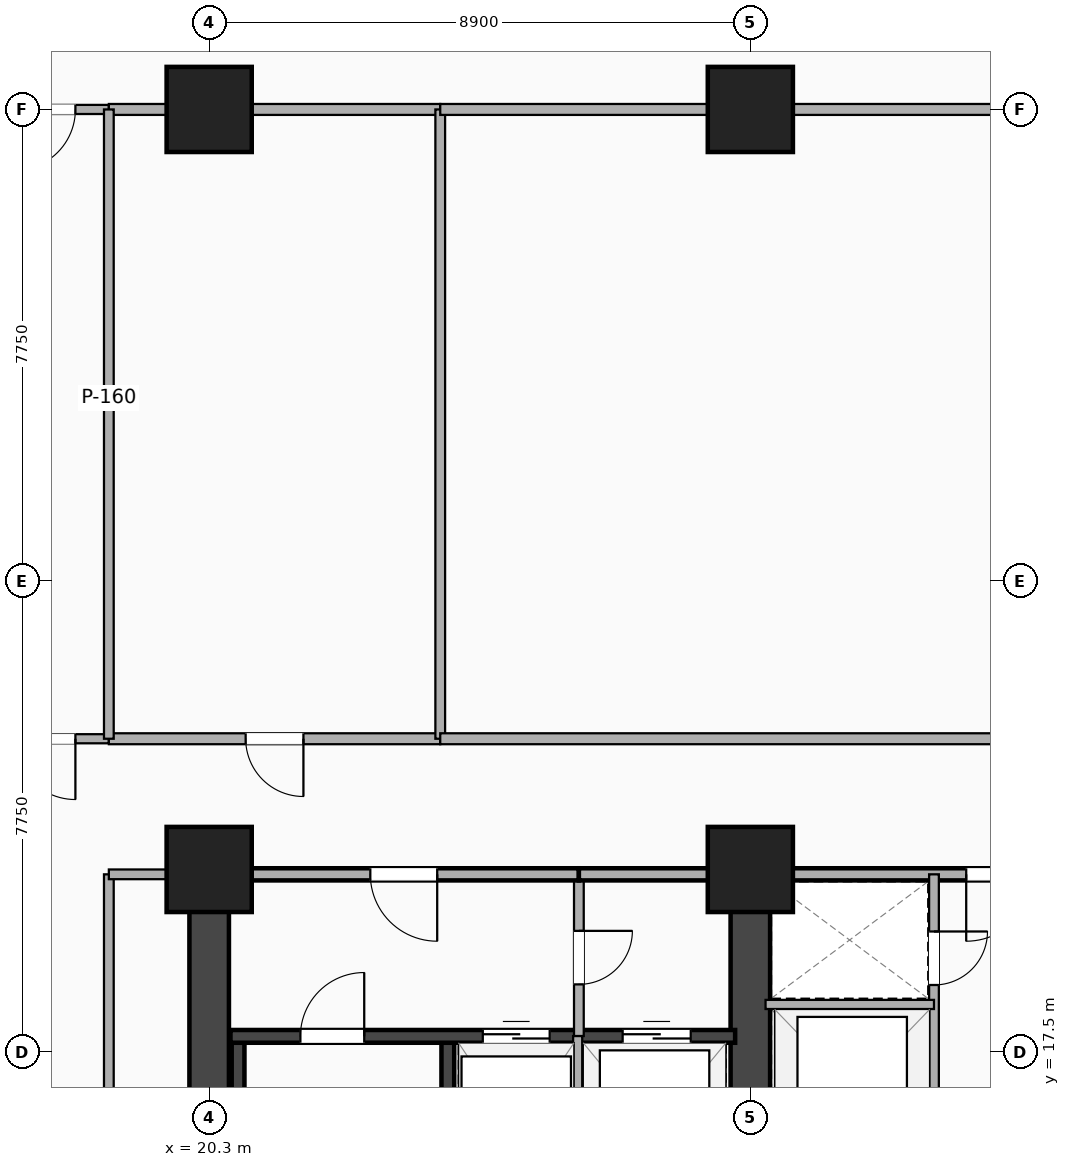
"""IFC4 building model, lengths in metres.
Left out: names, types, materials, properties, quantities, classifications, styles, units other than length and angle.
Written with IfcOpenShell. Run it as: python <this file> out.ifc"""

import sys

from ifc_helpers import new_model, si_unit, direction, frame, frame_2d, origin, origin_2d, place, context, subcontext, project, spatial, rectangle, extrude, element, fill, save


model = new_model("IFC4")
c1 = context("Model", 3, precision=1e-05, world=origin(), true_north=direction((0.0, 1.0)))
c2 = subcontext(c1, "Body", "Model", "MODEL_VIEW")
j1 = project(units=[si_unit("LENGTHUNIT", "METRE"), si_unit("PLANEANGLEUNIT", "RADIAN")], contexts=[c1])
p1 = place(None, origin())
s1 = spatial("IfcSite", under=j1, at=p1, CompositionType="ELEMENT")
p2 = place(p1, origin())
s2 = spatial("IfcBuilding", under=s1, at=p2, CompositionType="ELEMENT")
p3 = place(p2, frame((0.0, 0.0, 64.9)))
s3 = spatial("IfcBuildingStorey", under=s2, at=p3, CompositionType="ELEMENT", Elevation=64.9)
p4 = place(p3, frame((20.3, 3.5, 0.0), z_axis=(0.0, 0.0, 1.0), x_axis=(0.0, 1.0, 0.0)))
e1 = element("IfcWall", 1, at=p4, inside=s3, PredefinedType="SHEAR", context=c2, shape_type="SweptSolid", body=[
    extrude(rectangle(XDim=16.9, YDim=0.65, at=frame_2d((8.45, 0.0))), origin(), (0.0, 0.0, 1.0), 3.22),
])
p5 = place(p3, frame((29.2, 3.5, 0.0), z_axis=(0.0, 0.0, 1.0), x_axis=(0.0, 1.0, 0.0)))
e2 = element("IfcWall", 2, at=p5, inside=s3, PredefinedType="SHEAR", context=c2, shape_type="SweptSolid", body=[
    extrude(rectangle(XDim=16.9, YDim=0.65, at=frame_2d((8.45, 0.0))), origin(), (0.0, 0.0, 1.0), 3.22),
])
p6 = place(p5, frame((7.75, 0.0, 0.0), z_axis=(0.0, 0.0, 1.0), x_axis=(-1.0, 0.0, 0.0)))
e3 = element("IfcOpeningElement", 3, at=p6, cuts=e2, PredefinedType="OPENING", context=c2, shape_type="SweptSolid", body=[
    extrude(rectangle(XDim=1.1, YDim=2.15, at=frame_2d((0.55, 1.075))), frame((0.0, 0.335, 0.0), z_axis=(0.0, -1.0, 0.0), x_axis=(1.0, 0.0, 0.0)), (0.0, 0.0, 1.0), 0.67),
])
for number, where, z_axis, x_axis in (
    (4, (20.775, 9.745, 0.0), (0.0, 0.0, 1.0), (0.0, 1.0, 0.0)),
    (5, (24.225, 9.745, 0.0), (0.0, 0.0, 1.0), (0.0, 1.0, 0.0)),
):
    element("IfcWall", number, at=place(p3, frame(where, z_axis=z_axis, x_axis=x_axis)), inside=s3, PredefinedType="SHEAR", context=c2, shape_type="SweptSolid", body=[
        extrude(rectangle(XDim=8.01, YDim=0.21, at=frame_2d((4.005, 0.0))), origin(), (0.0, 0.0, 1.0), 3.22),
    ])
p7 = place(p3, frame((20.65, 17.755, 0.0), z_axis=(0.0, 0.0, 1.0), x_axis=(1.0, 0.0, 0.0)))
e6 = element("IfcWall", 6, at=p7, inside=s3, PredefinedType="SHEAR", context=c2, shape_type="SweptSolid", body=[
    extrude(rectangle(XDim=8.3, YDim=0.21, at=frame_2d((4.15, 0.0))), origin(), (0.0, 0.0, 1.0), 3.22),
])
p8 = place(p7, frame((2.2, 0.0, 0.0), z_axis=(0.0, 0.0, 1.0), x_axis=(-1.0, 0.0, 0.0)))
e7 = element("IfcOpeningElement", 7, at=p8, cuts=e6, PredefinedType="OPENING", context=c2, shape_type="SweptSolid", body=[
    extrude(rectangle(XDim=1.05, YDim=2.15, at=frame_2d((0.525, 1.075))), frame((0.0, 0.115, 0.0), z_axis=(0.0, -1.0, 0.0), x_axis=(1.0, 0.0, 0.0)), (0.0, 0.0, 1.0), 0.23),
])
p9 = place(p7, frame((4.15, 0.0, 0.0)))
e8 = element("IfcOpeningElement", 8, at=p9, cuts=e6, PredefinedType="OPENING", context=c2, shape_type="SweptSolid", body=[
    extrude(rectangle(XDim=1.1, YDim=2.18, at=frame_2d((0.55, 1.09))), frame((0.0, 0.115, 0.0), z_axis=(0.0, -1.0, 0.0), x_axis=(1.0, 0.0, 0.0)), (0.0, 0.0, 1.0), 0.23),
])
p10 = place(p7, frame((6.45, 0.0, 0.0)))
e9 = element("IfcOpeningElement", 9, at=p10, cuts=e6, PredefinedType="OPENING", context=c2, shape_type="SweptSolid", body=[
    extrude(rectangle(XDim=1.12, YDim=2.2, at=frame_2d((0.56, 1.1))), frame((0.0, 0.115, 0.0), z_axis=(0.0, -1.0, 0.0), x_axis=(1.0, 0.0, 0.0)), (0.0, 0.0, 1.0), 0.23),
])
for number, where, z_axis, x_axis in (
    (10, (20.3, 20.5, -0.28), (0.0, 0.0, 1.0), (1.0, 0.0, 0.0)),
    (11, (29.2, 20.5, -0.28), (0.0, 0.0, 1.0), (1.0, 0.0, 0.0)),
    (12, (20.3, 33.0, -0.28), (0.0, 0.0, 1.0), (1.0, 0.0, 0.0)),
    (13, (29.2, 33.0, -0.28), (0.0, 0.0, 1.0), (1.0, 0.0, 0.0)),
):
    element("IfcColumn", number, at=place(p3, frame(where, z_axis=z_axis, x_axis=x_axis)), inside=s3, PredefinedType="COLUMN", context=c2, shape_type="SweptSolid", body=[
        extrude(rectangle(XDim=1.4, YDim=1.4, at=origin_2d()), origin(), (0.0, 0.0, 1.0), 3.5),
    ])
p11 = place(p3, frame((26.38, 17.76, 0.0), z_axis=(0.0, 0.0, 1.0), x_axis=(0.0, 1.0, 0.0)))
e14 = element("IfcWall", 14, at=p11, inside=s3, PredefinedType="PARTITIONING", context=c2, shape_type="SweptSolid", body=[
    extrude(rectangle(XDim=2.66, YDim=0.16, at=frame_2d((1.33, 0.0))), origin(), (0.0, 0.0, 1.0), 2.51),
])
p12 = place(p11, frame((0.85, 0.0, 0.0)))
e15 = element("IfcOpeningElement", 15, at=p12, cuts=e14, PredefinedType="OPENING", context=c2, shape_type="SweptSolid", body=[
    extrude(rectangle(XDim=0.88, YDim=2.08, at=frame_2d((0.44, 1.04))), frame((0.0, 0.09, 0.0), z_axis=(0.0, -1.0, 0.0), x_axis=(1.0, 0.0, 0.0)), (0.0, 0.0, 1.0), 0.18),
])
p13 = place(p3, frame((26.36, 14.72, 0.0), z_axis=(0.0, 0.0, 1.0), x_axis=(0.0, 1.0, 0.0)))
e16 = element("IfcWall", 16, at=p13, inside=s3, PredefinedType="PARTITIONING", context=c2, shape_type="SweptSolid", body=[
    extrude(rectangle(XDim=3.04, YDim=0.15, at=frame_2d((1.52, 0.0))), origin(), (0.0, 0.0, 1.0), 3.22),
])
p14 = place(p3, frame((20.65, 20.42, 0.0), z_axis=(0.0, 0.0, 1.0), x_axis=(1.0, 0.0, 0.0)))
e17 = element("IfcWall", 17, at=p14, inside=s3, PredefinedType="PARTITIONING", context=c2, shape_type="SweptSolid", body=[
    extrude(rectangle(XDim=5.73, YDim=0.2, at=frame_2d((2.865, 0.0))), origin(), (0.0, 0.0, 1.0), 2.51),
])
p15 = place(p14, frame((2.3, 0.0, 0.0)))
e18 = element("IfcOpeningElement", 18, at=p15, cuts=e17, PredefinedType="OPENING", context=c2, shape_type="SweptSolid", body=[
    extrude(rectangle(XDim=1.1, YDim=2.15, at=frame_2d((0.55, 1.075))), frame((0.0, 0.11, 0.0), z_axis=(0.0, -1.0, 0.0), x_axis=(1.0, 0.0, 0.0)), (0.0, 0.0, 1.0), 0.22),
])
p16 = place(p3, frame((26.38, 20.42, 0.0), z_axis=(0.0, 0.0, 1.0), x_axis=(1.0, 0.0, 0.0)))
e19 = element("IfcWall", 19, at=p16, inside=s3, PredefinedType="PARTITIONING", context=c2, shape_type="SweptSolid", body=[
    extrude(rectangle(XDim=2.82, YDim=0.2, at=frame_2d((1.41, 0.0))), origin(), (0.0, 0.0, 1.0), 2.51),
])
p17 = place(p3, frame((29.2, 20.42, 0.0), z_axis=(0.0, 0.0, 1.0), x_axis=(1.0, 0.0, 0.0)))
e20 = element("IfcWall", 20, at=p17, inside=s3, PredefinedType="PARTITIONING", context=c2, shape_type="SweptSolid", body=[
    extrude(rectangle(XDim=7.8, YDim=0.2, at=frame_2d((3.9, 0.0))), origin(), (0.0, 0.0, 1.0), 2.51),
])
p18 = place(p17, frame((3.55, 0.0, 0.0)))
e21 = element("IfcOpeningElement", 21, at=p18, cuts=e20, PredefinedType="OPENING", context=c2, shape_type="SweptSolid", body=[
    extrude(rectangle(XDim=1.1, YDim=2.15, at=frame_2d((0.55, 1.075))), frame((0.0, 0.11, 0.0), z_axis=(0.0, -1.0, 0.0), x_axis=(1.0, 0.0, 0.0)), (0.0, 0.0, 1.0), 0.22),
])
p19 = place(p3, frame((32.22, 12.5, 0.0), z_axis=(0.0, 0.0, 1.0), x_axis=(0.0, 1.0, 0.0)))
e22 = element("IfcWall", 22, at=p19, inside=s3, PredefinedType="PARTITIONING", context=c2, shape_type="SweptSolid", body=[
    extrude(rectangle(XDim=7.92, YDim=0.16, at=frame_2d((3.96, 0.0))), origin(), (0.0, 0.0, 1.0), 2.51),
])
p20 = place(p19, frame((6.1, 0.0, 0.0)))
e23 = element("IfcOpeningElement", 23, at=p20, cuts=e22, PredefinedType="OPENING", context=c2, shape_type="SweptSolid", body=[
    extrude(rectangle(XDim=0.88, YDim=2.08, at=frame_2d((0.44, 1.04))), frame((0.0, 0.09, 0.0), z_axis=(0.0, -1.0, 0.0), x_axis=(1.0, 0.0, 0.0)), (0.0, 0.0, 1.0), 0.18),
])
p21 = place(p3, frame((29.45, 18.28, 0.0), z_axis=(0.0, 0.0, 1.0), x_axis=(1.0, 0.0, 0.0)))
e24 = element("IfcWall", 24, at=p21, inside=s3, PredefinedType="PARTITIONING", context=c2, shape_type="SweptSolid", body=[
    extrude(rectangle(XDim=2.77, YDim=0.15, at=frame_2d((1.385, 0.0))), origin(), (0.0, 0.0, 1.0), 3.22),
])
p22 = place(p3, frame((18.65, 12.1, 0.0), z_axis=(0.0, 0.0, 1.0), x_axis=(0.0, 1.0, 0.0)))
e25 = element("IfcWall", 25, at=p22, inside=s3, PredefinedType="PARTITIONING", context=c2, shape_type="SweptSolid", body=[
    extrude(rectangle(XDim=8.32, YDim=0.16, at=frame_2d((4.16, 0.0))), origin(), (0.0, 0.0, 1.0), 2.51),
])
p23 = place(p22, frame((1.28, 0.0, 0.0), z_axis=(0.0, 0.0, 1.0), x_axis=(-1.0, 0.0, 0.0)))
e26 = element("IfcOpeningElement", 26, at=p23, cuts=e25, PredefinedType="OPENING", context=c2, shape_type="SweptSolid", body=[
    extrude(rectangle(XDim=0.88, YDim=2.08, at=frame_2d((0.44, 1.04))), frame((0.0, 0.09, 0.0), z_axis=(0.0, -1.0, 0.0), x_axis=(1.0, 0.0, 0.0)), (0.0, 0.0, 1.0), 0.18),
])
p24 = place(p3, frame((18.65, 20.42, 0.0), z_axis=(0.0, 0.0, 1.0), x_axis=(1.0, 0.0, 0.0)))
e27 = element("IfcWall", 27, at=p24, inside=s3, PredefinedType="PARTITIONING", context=c2, shape_type="SweptSolid", body=[
    extrude(rectangle(XDim=1.65, YDim=0.16, at=frame_2d((0.825, 0.0))), origin(), (0.0, 0.0, 1.0), 2.51),
])
p25 = place(p3, frame((16.65, 22.65, 0.0), z_axis=(0.0, 0.0, 1.0), x_axis=(1.0, 0.0, 0.0)))
e28 = element("IfcWall", 28, at=p25, inside=s3, PredefinedType="PARTITIONING", context=c2, shape_type="SweptSolid", body=[
    extrude(rectangle(XDim=2.0, YDim=0.15, at=frame_2d((1.0, 0.0))), origin(), (0.0, 0.0, 1.0), 3.22),
])
p26 = place(p25, frame((0.45, 0.0, 0.0)))
e29 = element("IfcOpeningElement", 29, at=p26, cuts=e28, PredefinedType="OPENING", context=c2, shape_type="SweptSolid", body=[
    extrude(rectangle(XDim=1.0, YDim=2.15, at=frame_2d((0.5, 1.075))), frame((0.0, 0.085, 0.0), z_axis=(0.0, -1.0, 0.0), x_axis=(1.0, 0.0, 0.0)), (0.0, 0.0, 1.0), 0.17),
])
p27 = place(p3, frame((16.65, 33.0, 0.0), z_axis=(0.0, 0.0, 1.0), x_axis=(1.0, 0.0, 0.0)))
e30 = element("IfcWall", 30, at=p27, inside=s3, PredefinedType="PARTITIONING", context=c2, shape_type="SweptSolid", body=[
    extrude(rectangle(XDim=2.0, YDim=0.15, at=frame_2d((1.0, 0.0))), origin(), (0.0, 0.0, 1.0), 2.51),
])
p28 = place(p27, frame((0.45, 0.0, 0.0)))
e31 = element("IfcOpeningElement", 31, at=p28, cuts=e30, PredefinedType="OPENING", context=c2, shape_type="SweptSolid", body=[
    extrude(rectangle(XDim=1.0, YDim=2.15, at=frame_2d((0.5, 1.075))), frame((0.0, 0.085, 0.0), z_axis=(0.0, -1.0, 0.0), x_axis=(1.0, 0.0, 0.0)), (0.0, 0.0, 1.0), 0.17),
])
p29 = place(p3, frame((18.65, 22.65, 0.0), z_axis=(0.0, 0.0, 1.0), x_axis=(1.0, 0.0, 0.0)))
e32 = element("IfcWall", 32, at=p29, inside=s3, PredefinedType="PARTITIONING", context=c2, shape_type="SweptSolid", body=[
    extrude(rectangle(XDim=5.45, YDim=0.18, at=frame_2d((2.725, 0.0))), origin(), (0.0, 0.0, 1.0), 2.51),
])
p30 = place(p29, frame((2.25, 0.0, 0.0)))
e33 = element("IfcOpeningElement", 33, at=p30, cuts=e32, PredefinedType="OPENING", context=c2, shape_type="SweptSolid", body=[
    extrude(rectangle(XDim=0.95, YDim=2.15, at=frame_2d((0.475, 1.075))), frame((0.0, 0.1, 0.0), z_axis=(0.0, -1.0, 0.0), x_axis=(1.0, 0.0, 0.0)), (0.0, 0.0, 1.0), 0.2),
])
p31 = place(p3, frame((18.65, 33.0, 0.0), z_axis=(0.0, 0.0, 1.0), x_axis=(1.0, 0.0, 0.0)))
e34 = element("IfcWall", 34, at=p31, inside=s3, PredefinedType="PARTITIONING", context=c2, shape_type="SweptSolid", body=[
    extrude(rectangle(XDim=5.45, YDim=0.18, at=frame_2d((2.725, 0.0))), origin(), (0.0, 0.0, 1.0), 2.51),
])
for number, where, z_axis, x_axis in (
    (35, (18.65, 22.65, 0.0), (0.0, 0.0, 1.0), (0.0, 1.0, 0.0)),
    (36, (24.1, 22.65, 0.0), (0.0, 0.0, 1.0), (0.0, 1.0, 0.0)),
):
    element("IfcWall", number, at=place(p3, frame(where, z_axis=z_axis, x_axis=x_axis)), inside=s3, PredefinedType="PARTITIONING", context=c2, shape_type="SweptSolid", body=[
        extrude(rectangle(XDim=10.35, YDim=0.16, at=frame_2d((5.175, 0.0))), origin(), (0.0, 0.0, 1.0), 2.51),
    ])
p32 = place(p3, frame((24.1, 22.65, 0.0), z_axis=(0.0, 0.0, 1.0), x_axis=(1.0, 0.0, 0.0)))
e37 = element("IfcWall", 37, at=p32, inside=s3, PredefinedType="PARTITIONING", context=c2, shape_type="SweptSolid", body=[
    extrude(rectangle(XDim=22.35, YDim=0.18, at=frame_2d((11.175, 0.0))), origin(), (0.0, 0.0, 1.0), 2.51),
])
p33 = place(p32, frame((10.7, 0.0, 0.0)))
e38 = element("IfcOpeningElement", 38, at=p33, cuts=e37, PredefinedType="OPENING", context=c2, shape_type="SweptSolid", body=[
    extrude(rectangle(XDim=0.95, YDim=2.15, at=frame_2d((0.475, 1.075))), frame((0.0, 0.1, 0.0), z_axis=(0.0, -1.0, 0.0), x_axis=(1.0, 0.0, 0.0)), (0.0, 0.0, 1.0), 0.2),
])
p34 = place(p3, frame((24.1, 33.0, 0.0), z_axis=(0.0, 0.0, 1.0), x_axis=(1.0, 0.0, 0.0)))
e39 = element("IfcWall", 39, at=p34, inside=s3, PredefinedType="PARTITIONING", context=c2, shape_type="SweptSolid", body=[
    extrude(rectangle(XDim=22.35, YDim=0.18, at=frame_2d((11.175, 0.0))), origin(), (0.0, 0.0, 1.0), 2.51),
])
p35 = place(p8, origin())
e40 = element("IfcDoor", 40, at=p35, inside=s3, OperationType="SINGLE_SWING_RIGHT", PredefinedType="DOOR", context=c2, shape_type="SweptSolid", body=[
    extrude(rectangle(XDim=1.05, YDim=2.15, at=frame_2d((0.525, 1.075))), frame((0.0, 0.025, 0.0), z_axis=(0.0, -1.0, 0.0), x_axis=(1.0, 0.0, 0.0)), (0.0, 0.0, 1.0), 0.05),
])
fill(e7, e40)
p36 = place(p9, origin())
e41 = element("IfcDoor", 41, at=p36, inside=s3, OperationType="DOUBLE_DOOR_SLIDING", PredefinedType="DOOR", context=c2, shape_type="SweptSolid", body=[
    extrude(rectangle(XDim=1.1, YDim=2.18, at=frame_2d((0.55, 1.09))), frame((0.0, 0.025, 0.0), z_axis=(0.0, -1.0, 0.0), x_axis=(1.0, 0.0, 0.0)), (0.0, 0.0, 1.0), 0.05),
])
fill(e8, e41)
p37 = place(p10, origin())
e42 = element("IfcDoor", 42, at=p37, inside=s3, OperationType="DOUBLE_DOOR_SLIDING", PredefinedType="DOOR", context=c2, shape_type="SweptSolid", body=[
    extrude(rectangle(XDim=1.12, YDim=2.2, at=frame_2d((0.56, 1.1))), frame((0.0, 0.025, 0.0), z_axis=(0.0, -1.0, 0.0), x_axis=(1.0, 0.0, 0.0)), (0.0, 0.0, 1.0), 0.05),
])
fill(e9, e42)
p38 = place(p12, origin())
e43 = element("IfcDoor", 43, at=p38, inside=s3, OperationType="SINGLE_SWING_RIGHT", PredefinedType="DOOR", context=c2, shape_type="SweptSolid", body=[
    extrude(rectangle(XDim=0.88, YDim=2.08, at=frame_2d((0.44, 1.04))), frame((0.0, 0.025, 0.0), z_axis=(0.0, -1.0, 0.0), x_axis=(1.0, 0.0, 0.0)), (0.0, 0.0, 1.0), 0.05),
])
fill(e15, e43)
p39 = place(p15, origin())
e44 = element("IfcDoor", 44, at=p39, inside=s3, OperationType="SINGLE_SWING_RIGHT", PredefinedType="DOOR", context=c2, shape_type="SweptSolid", body=[
    extrude(rectangle(XDim=1.1, YDim=2.15, at=frame_2d((0.55, 1.075))), frame((0.0, 0.025, 0.0), z_axis=(0.0, -1.0, 0.0), x_axis=(1.0, 0.0, 0.0)), (0.0, 0.0, 1.0), 0.05),
])
fill(e18, e44)
p40 = place(p18, origin())
e45 = element("IfcDoor", 45, at=p40, inside=s3, OperationType="SINGLE_SWING_LEFT", PredefinedType="DOOR", context=c2, shape_type="SweptSolid", body=[
    extrude(rectangle(XDim=1.1, YDim=2.15, at=frame_2d((0.55, 1.075))), frame((0.0, 0.025, 0.0), z_axis=(0.0, -1.0, 0.0), x_axis=(1.0, 0.0, 0.0)), (0.0, 0.0, 1.0), 0.05),
])
fill(e21, e45)
p41 = place(p20, origin())
e46 = element("IfcDoor", 46, at=p41, inside=s3, OperationType="SINGLE_SWING_RIGHT", PredefinedType="DOOR", context=c2, shape_type="SweptSolid", body=[
    extrude(rectangle(XDim=0.88, YDim=2.08, at=frame_2d((0.44, 1.04))), frame((0.0, 0.025, 0.0), z_axis=(0.0, -1.0, 0.0), x_axis=(1.0, 0.0, 0.0)), (0.0, 0.0, 1.0), 0.05),
])
fill(e23, e46)
p42 = place(p26, origin())
e47 = element("IfcDoor", 47, at=p42, inside=s3, OperationType="SINGLE_SWING_RIGHT", PredefinedType="DOOR", context=c2, shape_type="SweptSolid", body=[
    extrude(rectangle(XDim=1.0, YDim=2.15, at=frame_2d((0.5, 1.075))), frame((0.0, 0.025, 0.0), z_axis=(0.0, -1.0, 0.0), x_axis=(1.0, 0.0, 0.0)), (0.0, 0.0, 1.0), 0.05),
])
fill(e29, e47)
p43 = place(p28, origin())
e48 = element("IfcDoor", 48, at=p43, inside=s3, OperationType="SINGLE_SWING_LEFT", PredefinedType="DOOR", context=c2, shape_type="SweptSolid", body=[
    extrude(rectangle(XDim=1.0, YDim=2.15, at=frame_2d((0.5, 1.075))), frame((0.0, 0.025, 0.0), z_axis=(0.0, -1.0, 0.0), x_axis=(1.0, 0.0, 0.0)), (0.0, 0.0, 1.0), 0.05),
])
fill(e31, e48)
p44 = place(p30, origin())
e49 = element("IfcDoor", 49, at=p44, inside=s3, OperationType="SINGLE_SWING_RIGHT", PredefinedType="DOOR", context=c2, shape_type="SweptSolid", body=[
    extrude(rectangle(XDim=0.95, YDim=2.15, at=frame_2d((0.475, 1.075))), frame((0.0, 0.025, 0.0), z_axis=(0.0, -1.0, 0.0), x_axis=(1.0, 0.0, 0.0)), (0.0, 0.0, 1.0), 0.05),
])
fill(e33, e49)
save(model, sys.argv[1])
